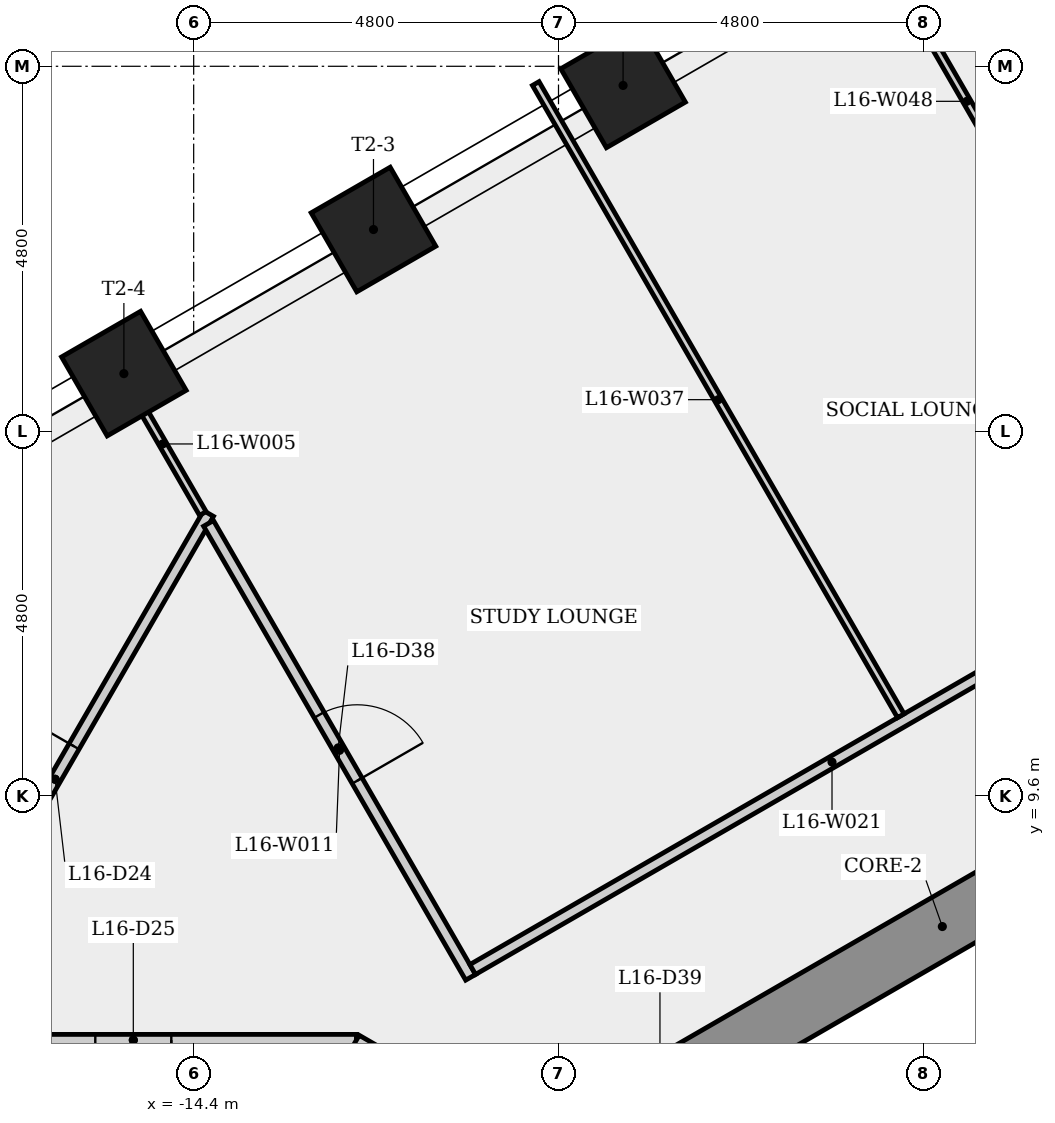
"""IFC4 building model, lengths in metres.
Left out: names, types, materials, properties, quantities, classifications, styles, units other than length and angle.
Written with IfcOpenShell. Run it as: python <this file> out.ifc"""

import sys

from ifc_helpers import new_model, si_unit, direction, frame, frame_2d, origin, origin_2d, place, context, subcontext, project, spatial, rectangle, extrude, element, fill, save


model = new_model("IFC4")
c1 = context("Model", 3, precision=1e-05, world=origin(), true_north=direction((0.0, 1.0)))
c2 = subcontext(c1, "Body", "Model", "MODEL_VIEW")
j1 = project(units=[si_unit("LENGTHUNIT", "METRE"), si_unit("PLANEANGLEUNIT", "RADIAN")], contexts=[c1])
p1 = place(None, origin())
s1 = spatial("IfcSite", under=j1, at=p1, CompositionType="ELEMENT")
p2 = place(p1, origin())
s2 = spatial("IfcBuilding", under=s1, at=p2, CompositionType="ELEMENT")
p3 = place(p2, frame((0.0, 0.0, 62.9)))
s3 = spatial("IfcBuildingStorey", under=s2, at=p3, CompositionType="ELEMENT", Elevation=62.9)
p4 = place(p3, frame((0.2, 10.623, 0.0), z_axis=(0.0, 0.0, 1.0), x_axis=(-0.866023993627, -0.500002442456, 0.0)))
e1 = element("IfcWall", 1, at=p4, inside=s3, PredefinedType="SHEAR", context=c2, shape_type="SweptSolid", body=[
    extrude(rectangle(XDim=10.97, YDim=0.8, at=frame_2d((5.485, 0.0))), origin(), (0.0, 0.0, 1.0), 3.4),
])
p5 = place(p4, frame((9.325, 0.0, 0.0)))
e2 = element("IfcOpeningElement", 2, at=p5, cuts=e1, PredefinedType="OPENING", context=c2, shape_type="SweptSolid", body=[
    extrude(rectangle(XDim=0.9, YDim=2.1, at=frame_2d((0.45, 1.05))), frame((0.0, 0.41, 0.0), z_axis=(0.0, -1.0, 0.0), x_axis=(1.0, 0.0, 0.0)), (0.0, 0.0, 1.0), 0.82),
])
p6 = place(p4, frame((2.091, 0.0, 0.0)))
e3 = element("IfcOpeningElement", 3, at=p6, cuts=e1, PredefinedType="OPENING", context=c2, shape_type="SweptSolid", body=[
    extrude(rectangle(XDim=0.9, YDim=2.1, at=frame_2d((0.45, 1.05))), frame((0.0, 0.41, 0.0), z_axis=(0.0, -1.0, 0.0), x_axis=(1.0, 0.0, 0.0)), (0.0, 0.0, 1.0), 0.82),
])
for number, where, z_axis, x_axis in (
    (4, (-8.75, 18.948, 0.0), (0.0, 0.0, 1.0), (-0.5, 0.866, 0.0)),
    (5, (-12.034, 17.052, 0.0), (0.0, 0.0, 1.0), (-0.5, 0.866, 0.0)),
    (6, (-15.318, 15.156, 0.0), (0.0, 0.0, 1.0), (-0.5, 0.866, 0.0)),
):
    element("IfcColumn", number, at=place(p3, frame(where, z_axis=z_axis, x_axis=x_axis)), inside=s3, PredefinedType="COLUMN", context=c2, shape_type="SweptSolid", body=[
        extrude(rectangle(XDim=1.2, YDim=1.2, at=origin_2d()), origin(), (0.0, 0.0, 1.0), 3.4),
    ])
p7 = place(p3, frame((-18.242, 6.322, 0.0), z_axis=(0.0, 0.0, 1.0), x_axis=(0.499995499922, 0.86602800189, 0.0)))
e7 = element("IfcWall", 7, at=p7, inside=s3, PredefinedType="PARTITIONING", context=c2, shape_type="SweptSolid", body=[
    extrude(rectangle(XDim=8.075, YDim=0.15, at=frame_2d((4.038, 0.0))), origin(), (0.0, 0.0, 1.0), 3.0),
])
p8 = place(p7, frame((3.538, 0.0, 0.0)))
e8 = element("IfcOpeningElement", 8, at=p8, cuts=e7, PredefinedType="OPENING", context=c2, shape_type="SweptSolid", body=[
    extrude(rectangle(XDim=1.0, YDim=2.1, at=frame_2d((0.5, 1.05))), frame((0.0, 0.085, 0.0), z_axis=(0.0, -1.0, 0.0), x_axis=(1.0, 0.0, 0.0)), (0.0, 0.0, 1.0), 0.17),
])
p9 = place(p3, frame((-15.336, 15.146, 0.0), z_axis=(0.0, 0.0, 1.0), x_axis=(0.499965779899, -0.866045159867, 0.0)))
e9 = element("IfcWall", 9, at=p9, inside=s3, PredefinedType="PARTITIONING", context=c2, shape_type="SweptSolid", body=[
    extrude(rectangle(XDim=2.114, YDim=0.1, at=frame_2d((1.057, 0.0))), origin(), (0.0, 0.0, 1.0), 3.0),
])
p10 = place(p3, frame((-14.204, 13.186, 0.0), z_axis=(0.0, 0.0, 1.0), x_axis=(0.500022773673, -0.866012254999, 0.0)))
e10 = element("IfcWall", 10, at=p10, inside=s3, PredefinedType="PARTITIONING", context=c2, shape_type="SweptSolid", body=[
    extrude(rectangle(XDim=6.896, YDim=0.15, at=frame_2d((3.448, 0.0))), origin(), (0.0, 0.0, 1.0), 3.0),
])
p11 = place(p10, frame((2.911, 0.0, 0.0)))
e11 = element("IfcOpeningElement", 11, at=p11, cuts=e10, PredefinedType="OPENING", context=c2, shape_type="SweptSolid", body=[
    extrude(rectangle(XDim=1.0, YDim=2.1, at=frame_2d((0.5, 1.05))), frame((0.0, 0.085, 0.0), z_axis=(0.0, -1.0, 0.0), x_axis=(1.0, 0.0, 0.0)), (0.0, 0.0, 1.0), 0.17),
])
p12 = place(p3, frame((-12.259, 6.387, 0.0), z_axis=(0.0, 0.0, 1.0), x_axis=(-1.0, 0.0, 0.0)))
e12 = element("IfcWall", 12, at=p12, inside=s3, PredefinedType="PARTITIONING", context=c2, shape_type="SweptSolid", body=[
    extrude(rectangle(XDim=5.871, YDim=0.15, at=frame_2d((2.935, 0.0))), origin(), (0.0, 0.0, 1.0), 3.0),
])
p13 = place(p12, frame((2.435, 0.0, 0.0)))
e13 = element("IfcOpeningElement", 13, at=p13, cuts=e12, PredefinedType="OPENING", context=c2, shape_type="SweptSolid", body=[
    extrude(rectangle(XDim=1.0, YDim=2.1, at=frame_2d((0.5, 1.05))), frame((0.0, 0.085, 0.0), z_axis=(0.0, -1.0, 0.0), x_axis=(1.0, 0.0, 0.0)), (0.0, 0.0, 1.0), 0.17),
])
p14 = place(p3, frame((-11.765, 6.1, 0.0), z_axis=(0.0, 0.0, 1.0), x_axis=(-0.865893856247, 0.500227777832, 0.0)))
e14 = element("IfcWall", 14, at=p14, inside=s3, PredefinedType="PARTITIONING", context=c2, shape_type="SweptSolid", body=[
    extrude(rectangle(XDim=0.572, YDim=0.15, at=frame_2d((0.286, 0.0))), origin(), (0.0, 0.0, 1.0), 3.0),
])
p15 = place(p3, frame((-10.729, 7.316, 0.0), z_axis=(0.0, 0.0, 1.0), x_axis=(0.86603401421, 0.499985086009, 0.0)))
e15 = element("IfcWall", 15, at=p15, inside=s3, PredefinedType="PARTITIONING", context=c2, shape_type="SweptSolid", body=[
    extrude(rectangle(XDim=10.917, YDim=0.15, at=frame_2d((5.458, 0.0))), origin(), (0.0, 0.0, 1.0), 3.0),
])
p16 = place(p3, frame((-5.096, 10.654, 0.0), z_axis=(0.0, 0.0, 1.0), x_axis=(-0.500006994331, 0.866021365568, 0.0)))
e16 = element("IfcWall", 16, at=p16, inside=s3, PredefinedType="PARTITIONING", context=c2, shape_type="SweptSolid", body=[
    extrude(rectangle(XDim=9.606, YDim=0.1, at=frame_2d((4.803, 0.0))), origin(), (0.0, 0.0, 1.0), 3.0),
])
p17 = place(p3, frame((-3.006, 16.624, 0.0), z_axis=(0.0, 0.0, 1.0), x_axis=(-0.499950314103, 0.86605408805, 0.0)))
e17 = element("IfcWall", 17, at=p17, inside=s3, PredefinedType="PARTITIONING", context=c2, shape_type="SweptSolid", body=[
    extrude(rectangle(XDim=4.885, YDim=0.1, at=frame_2d((2.442, 0.0))), origin(), (0.0, 0.0, 1.0), 3.0),
])
p18 = place(p8, origin())
e18 = element("IfcDoor", 18, at=p18, inside=s3, OperationType="SINGLE_SWING_RIGHT", PredefinedType="DOOR", context=c2, shape_type="SweptSolid", body=[
    extrude(rectangle(XDim=1.0, YDim=2.1, at=frame_2d((0.5, 1.05))), frame((0.0, 0.025, 0.0), z_axis=(0.0, -1.0, 0.0), x_axis=(1.0, 0.0, 0.0)), (0.0, 0.0, 1.0), 0.05),
])
fill(e8, e18)
p19 = place(p13, origin())
e19 = element("IfcDoor", 19, at=p19, inside=s3, OperationType="SINGLE_SWING_LEFT", PredefinedType="DOOR", context=c2, shape_type="SweptSolid", body=[
    extrude(rectangle(XDim=1.0, YDim=2.1, at=frame_2d((0.5, 1.05))), frame((0.0, 0.025, 0.0), z_axis=(0.0, -1.0, 0.0), x_axis=(1.0, 0.0, 0.0)), (0.0, 0.0, 1.0), 0.05),
])
fill(e13, e19)
p20 = place(p11, origin())
e20 = element("IfcDoor", 20, at=p20, inside=s3, OperationType="SINGLE_SWING_RIGHT", PredefinedType="DOOR", context=c2, shape_type="SweptSolid", body=[
    extrude(rectangle(XDim=1.0, YDim=2.1, at=frame_2d((0.5, 1.05))), frame((0.0, 0.025, 0.0), z_axis=(0.0, -1.0, 0.0), x_axis=(1.0, 0.0, 0.0)), (0.0, 0.0, 1.0), 0.05),
])
fill(e11, e20)
save(model, sys.argv[1])
